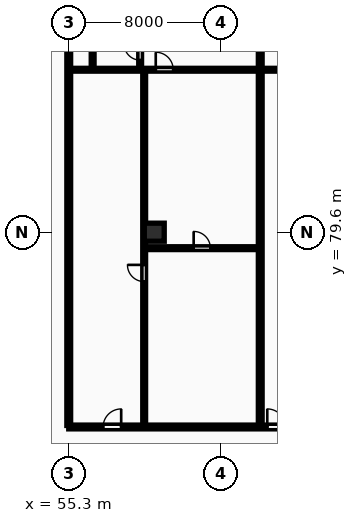
"""IFC4 building model, lengths in metres.
Left out: names, types, materials, properties, quantities, classifications, styles, units other than length and angle.
Written with IfcOpenShell. Run it as: python <this file> out.ifc"""

import sys

from ifc_helpers import new_model, si_unit, direction, frame, frame_2d, origin, origin_2d, place, context, subcontext, project, spatial, rectangle, extrude, element, fill, save


model = new_model("IFC4")
c1 = context("Model", 3, precision=1e-05, world=origin(), true_north=direction((0.0, 1.0)))
c2 = subcontext(c1, "Body", "Model", "MODEL_VIEW")
j1 = project(units=[si_unit("LENGTHUNIT", "METRE"), si_unit("PLANEANGLEUNIT", "RADIAN")], contexts=[c1])
p1 = place(None, origin())
s1 = spatial("IfcSite", under=j1, at=p1, CompositionType="ELEMENT")
p2 = place(p1, origin())
s2 = spatial("IfcBuilding", under=s1, at=p2, CompositionType="ELEMENT")
p3 = place(p2, frame((0.0, 0.0, 24.0)))
s3 = spatial("IfcBuildingStorey", under=s2, at=p3, CompositionType="ELEMENT", Elevation=24.0)
p4 = place(p3, frame((59.8, 79.6, 0.0), z_axis=(0.0, 0.0, 1.0), x_axis=(1.0, 0.0, 0.0)))
e1 = element("IfcColumn", 1, at=p4, inside=s3, PredefinedType="COLUMN", context=c2, shape_type="SweptSolid", body=[
    extrude(rectangle(XDim=1.05, YDim=0.95, at=origin_2d()), origin(), (0.0, 0.0, 1.0), 3.25),
])
for number, where, z_axis, x_axis in (
    (2, (55.3, 69.43, 0.0), (0.0, 0.0, 1.0), (0.0, 1.0, 0.0)),
    (3, (65.378, 69.43, 0.0), (0.0, 0.0, 1.0), (0.0, 1.0, 0.0)),
):
    element("IfcWall", number, at=place(p3, frame(where, z_axis=z_axis, x_axis=x_axis)), inside=s3, PredefinedType="PARTITIONING", context=c2, shape_type="SweptSolid", body=[
        extrude(rectangle(XDim=29.07, YDim=0.2, at=frame_2d((14.535, 0.0))), origin(), (0.0, 0.0, 1.0), 2.97),
    ])
p5 = place(p3, frame((59.33, 78.76, 0.0), z_axis=(0.0, 0.0, 1.0), x_axis=(1.0, 0.0, 0.0)))
e4 = element("IfcWall", 4, at=p5, inside=s3, PredefinedType="PARTITIONING", context=c2, shape_type="SweptSolid", body=[
    extrude(rectangle(XDim=5.968, YDim=0.15, at=frame_2d((2.984, 0.0))), origin(), (0.0, 0.0, 1.0), 2.97),
])
p6 = place(p5, frame((2.544, 0.0, 0.0)))
e5 = element("IfcOpeningElement", 5, at=p6, cuts=e4, PredefinedType="OPENING", context=c2, shape_type="SweptSolid", body=[
    extrude(rectangle(XDim=0.88, YDim=2.06, at=frame_2d((0.44, 1.03))), frame((0.0, 0.085, 0.0), z_axis=(0.0, -1.0, 0.0), x_axis=(1.0, 0.0, 0.0)), (0.0, 0.0, 1.0), 0.17),
])
p7 = place(p3, frame((59.27, 69.41, 0.0), z_axis=(0.0, 0.0, 1.0), x_axis=(0.0, 1.0, 0.0)))
e6 = element("IfcWall", 6, at=p7, inside=s3, PredefinedType="PARTITIONING", context=c2, shape_type="SweptSolid", body=[
    extrude(rectangle(XDim=18.7, YDim=0.15, at=frame_2d((9.35, 0.0))), origin(), (0.0, 0.0, 1.0), 2.97),
])
p8 = place(p7, frame((7.59, 0.0, 0.0)))
e7 = element("IfcOpeningElement", 7, at=p8, cuts=e6, PredefinedType="OPENING", context=c2, shape_type="SweptSolid", body=[
    extrude(rectangle(XDim=0.88, YDim=2.06, at=frame_2d((0.44, 1.03))), frame((0.0, 0.085, 0.0), z_axis=(0.0, -1.0, 0.0), x_axis=(1.0, 0.0, 0.0)), (0.0, 0.0, 1.0), 0.17),
])
p9 = place(p3, frame((56.558, 88.19, 0.0), z_axis=(0.0, 0.0, 1.0), x_axis=(0.0, 1.0, 0.0)))
e8 = element("IfcWall", 8, at=p9, inside=s3, PredefinedType="PARTITIONING", context=c2, shape_type="SweptSolid", body=[
    extrude(rectangle(XDim=5.0, YDim=0.15, at=frame_2d((2.5, 0.0))), origin(), (0.0, 0.0, 1.0), 2.97),
])
p10 = place(p9, frame((2.08, 0.0, 0.0)))
e9 = element("IfcOpeningElement", 9, at=p10, cuts=e8, PredefinedType="OPENING", context=c2, shape_type="SweptSolid", body=[
    extrude(rectangle(XDim=0.84, YDim=2.04, at=frame_2d((0.42, 1.02))), frame((0.0, 0.085, 0.0), z_axis=(0.0, -1.0, 0.0), x_axis=(1.0, 0.0, 0.0)), (0.0, 0.0, 1.0), 0.17),
])
p11 = place(p3, frame((59.058, 88.19, 0.0), z_axis=(0.0, 0.0, 1.0), x_axis=(0.0, 1.0, 0.0)))
e10 = element("IfcWall", 10, at=p11, inside=s3, PredefinedType="PARTITIONING", context=c2, shape_type="SweptSolid", body=[
    extrude(rectangle(XDim=5.0, YDim=0.15, at=frame_2d((2.5, 0.0))), origin(), (0.0, 0.0, 1.0), 2.97),
])
p12 = place(p11, frame((0.467, 0.0, 0.0)))
e11 = element("IfcOpeningElement", 11, at=p12, cuts=e10, PredefinedType="OPENING", context=c2, shape_type="SweptSolid", body=[
    extrude(rectangle(XDim=0.84, YDim=2.04, at=frame_2d((0.42, 1.02))), frame((0.0, 0.085, 0.0), z_axis=(0.0, -1.0, 0.0), x_axis=(1.0, 0.0, 0.0)), (0.0, 0.0, 1.0), 0.17),
])
p13 = place(p3, frame((55.38, 88.15, 0.0), z_axis=(0.0, 0.0, 1.0), x_axis=(1.0, 0.0, 0.0)))
e12 = element("IfcWall", 12, at=p13, inside=s3, PredefinedType="PARTITIONING", context=c2, shape_type="SweptSolid", body=[
    extrude(rectangle(XDim=9.918, YDim=0.15, at=frame_2d((4.959, 0.0))), origin(), (0.0, 0.0, 1.0), 2.97),
])
p14 = place(p13, frame((4.499, 0.0, 0.0)))
e13 = element("IfcOpeningElement", 13, at=p14, cuts=e12, PredefinedType="OPENING", context=c2, shape_type="SweptSolid", body=[
    extrude(rectangle(XDim=0.92, YDim=2.08, at=frame_2d((0.46, 1.04))), frame((0.0, 0.085, 0.0), z_axis=(0.0, -1.0, 0.0), x_axis=(1.0, 0.0, 0.0)), (0.0, 0.0, 1.0), 0.17),
])
p15 = place(p3, frame((65.458, 88.15, 0.0), z_axis=(0.0, 0.0, 1.0), x_axis=(1.0, 0.0, 0.0)))
e14 = element("IfcWall", 14, at=p15, inside=s3, PredefinedType="PARTITIONING", context=c2, shape_type="SweptSolid", body=[
    extrude(rectangle(XDim=10.926, YDim=0.15, at=frame_2d((5.463, 0.0))), origin(), (0.0, 0.0, 1.0), 2.97),
])
p16 = place(p15, frame((5.003, 0.0, 0.0)))
e15 = element("IfcOpeningElement", 15, at=p16, cuts=e14, PredefinedType="OPENING", context=c2, shape_type="SweptSolid", body=[
    extrude(rectangle(XDim=0.92, YDim=2.08, at=frame_2d((0.46, 1.04))), frame((0.0, 0.085, 0.0), z_axis=(0.0, -1.0, 0.0), x_axis=(1.0, 0.0, 0.0)), (0.0, 0.0, 1.0), 0.17),
])
p17 = place(p3, frame((55.3, 69.35, 0.0), z_axis=(0.0, 0.0, 1.0), x_axis=(1.0, 0.0, 0.0)))
e16 = element("IfcWall", 16, at=p17, inside=s3, PredefinedType="PARTITIONING", context=c2, shape_type="SweptSolid", body=[
    extrude(rectangle(XDim=77.6, YDim=0.2, at=frame_2d((38.8, 0.0))), origin(), (0.0, 0.0, 1.0), 2.97),
])
p18 = place(p17, frame((1.81, 0.0, 0.0)))
e17 = element("IfcOpeningElement", 17, at=p18, cuts=e16, PredefinedType="OPENING", context=c2, shape_type="SweptSolid", body=[
    extrude(rectangle(XDim=0.95, YDim=2.15, at=frame_2d((0.475, 1.075))), frame((0.0, 0.11, 0.0), z_axis=(0.0, -1.0, 0.0), x_axis=(1.0, 0.0, 0.0)), (0.0, 0.0, 1.0), 0.22),
])
p19 = place(p17, frame((10.448, 0.0, 0.0)))
e18 = element("IfcOpeningElement", 18, at=p19, cuts=e16, PredefinedType="OPENING", context=c2, shape_type="SweptSolid", body=[
    extrude(rectangle(XDim=0.95, YDim=2.15, at=frame_2d((0.475, 1.075))), frame((0.0, 0.11, 0.0), z_axis=(0.0, -1.0, 0.0), x_axis=(1.0, 0.0, 0.0)), (0.0, 0.0, 1.0), 0.22),
])
p20 = place(p17, frame((23.208, 0.0, 0.0)))
e19 = element("IfcOpeningElement", 19, at=p20, cuts=e16, PredefinedType="OPENING", context=c2, shape_type="SweptSolid", body=[
    extrude(rectangle(XDim=0.95, YDim=2.15, at=frame_2d((0.475, 1.075))), frame((0.0, 0.11, 0.0), z_axis=(0.0, -1.0, 0.0), x_axis=(1.0, 0.0, 0.0)), (0.0, 0.0, 1.0), 0.22),
])
p21 = place(p17, frame((33.287, 0.0, 0.0)))
e20 = element("IfcOpeningElement", 20, at=p21, cuts=e16, PredefinedType="OPENING", context=c2, shape_type="SweptSolid", body=[
    extrude(rectangle(XDim=0.95, YDim=2.15, at=frame_2d((0.475, 1.075))), frame((0.0, 0.11, 0.0), z_axis=(0.0, -1.0, 0.0), x_axis=(1.0, 0.0, 0.0)), (0.0, 0.0, 1.0), 0.22),
])
p22 = place(p17, frame((44.905, 0.0, 0.0)))
e21 = element("IfcOpeningElement", 21, at=p22, cuts=e16, PredefinedType="OPENING", context=c2, shape_type="SweptSolid", body=[
    extrude(rectangle(XDim=0.95, YDim=2.15, at=frame_2d((0.475, 1.075))), frame((0.0, 0.11, 0.0), z_axis=(0.0, -1.0, 0.0), x_axis=(1.0, 0.0, 0.0)), (0.0, 0.0, 1.0), 0.22),
])
p23 = place(p17, frame((54.119, 0.0, 0.0)))
e22 = element("IfcOpeningElement", 22, at=p23, cuts=e16, PredefinedType="OPENING", context=c2, shape_type="SweptSolid", body=[
    extrude(rectangle(XDim=0.95, YDim=2.15, at=frame_2d((0.475, 1.075))), frame((0.0, 0.11, 0.0), z_axis=(0.0, -1.0, 0.0), x_axis=(1.0, 0.0, 0.0)), (0.0, 0.0, 1.0), 0.22),
])
p24 = place(p17, frame((66.74, 0.0, 0.0)))
e23 = element("IfcOpeningElement", 23, at=p24, cuts=e16, PredefinedType="OPENING", context=c2, shape_type="SweptSolid", body=[
    extrude(rectangle(XDim=0.95, YDim=2.15, at=frame_2d((0.475, 1.075))), frame((0.0, 0.11, 0.0), z_axis=(0.0, -1.0, 0.0), x_axis=(1.0, 0.0, 0.0)), (0.0, 0.0, 1.0), 0.22),
])
p25 = place(p6, origin())
e24 = element("IfcDoor", 24, at=p25, inside=s3, OperationType="SINGLE_SWING_LEFT", PredefinedType="DOOR", context=c2, shape_type="SweptSolid", body=[
    extrude(rectangle(XDim=0.88, YDim=2.06, at=frame_2d((0.44, 1.03))), frame((0.0, 0.025, 0.0), z_axis=(0.0, -1.0, 0.0), x_axis=(1.0, 0.0, 0.0)), (0.0, 0.0, 1.0), 0.05),
])
fill(e5, e24)
p26 = place(p8, origin())
e25 = element("IfcDoor", 25, at=p26, inside=s3, OperationType="SINGLE_SWING_RIGHT", PredefinedType="DOOR", context=c2, shape_type="SweptSolid", body=[
    extrude(rectangle(XDim=0.88, YDim=2.06, at=frame_2d((0.44, 1.03))), frame((0.0, 0.025, 0.0), z_axis=(0.0, -1.0, 0.0), x_axis=(1.0, 0.0, 0.0)), (0.0, 0.0, 1.0), 0.05),
])
fill(e7, e25)
p27 = place(p12, origin())
e26 = element("IfcDoor", 26, at=p27, inside=s3, OperationType="SINGLE_SWING_RIGHT", PredefinedType="DOOR", context=c2, shape_type="SweptSolid", body=[
    extrude(rectangle(XDim=0.84, YDim=2.04, at=frame_2d((0.42, 1.02))), frame((0.0, 0.025, 0.0), z_axis=(0.0, -1.0, 0.0), x_axis=(1.0, 0.0, 0.0)), (0.0, 0.0, 1.0), 0.05),
])
fill(e11, e26)
p28 = place(p14, origin())
e27 = element("IfcDoor", 27, at=p28, inside=s3, OperationType="SINGLE_SWING_LEFT", PredefinedType="DOOR", context=c2, shape_type="SweptSolid", body=[
    extrude(rectangle(XDim=0.92, YDim=2.08, at=frame_2d((0.46, 1.04))), frame((0.0, 0.025, 0.0), z_axis=(0.0, -1.0, 0.0), x_axis=(1.0, 0.0, 0.0)), (0.0, 0.0, 1.0), 0.05),
])
fill(e13, e27)
p29 = place(p18, origin())
e28 = element("IfcDoor", 28, at=p29, inside=s3, OperationType="SINGLE_SWING_RIGHT", PredefinedType="DOOR", context=c2, shape_type="SweptSolid", body=[
    extrude(rectangle(XDim=0.95, YDim=2.15, at=frame_2d((0.475, 1.075))), frame((0.0, 0.025, 0.0), z_axis=(0.0, -1.0, 0.0), x_axis=(1.0, 0.0, 0.0)), (0.0, 0.0, 1.0), 0.05),
])
fill(e17, e28)
p30 = place(p19, origin())
e29 = element("IfcDoor", 29, at=p30, inside=s3, OperationType="SINGLE_SWING_LEFT", PredefinedType="DOOR", context=c2, shape_type="SweptSolid", body=[
    extrude(rectangle(XDim=0.95, YDim=2.15, at=frame_2d((0.475, 1.075))), frame((0.0, 0.025, 0.0), z_axis=(0.0, -1.0, 0.0), x_axis=(1.0, 0.0, 0.0)), (0.0, 0.0, 1.0), 0.05),
])
fill(e18, e29)
save(model, sys.argv[1])
